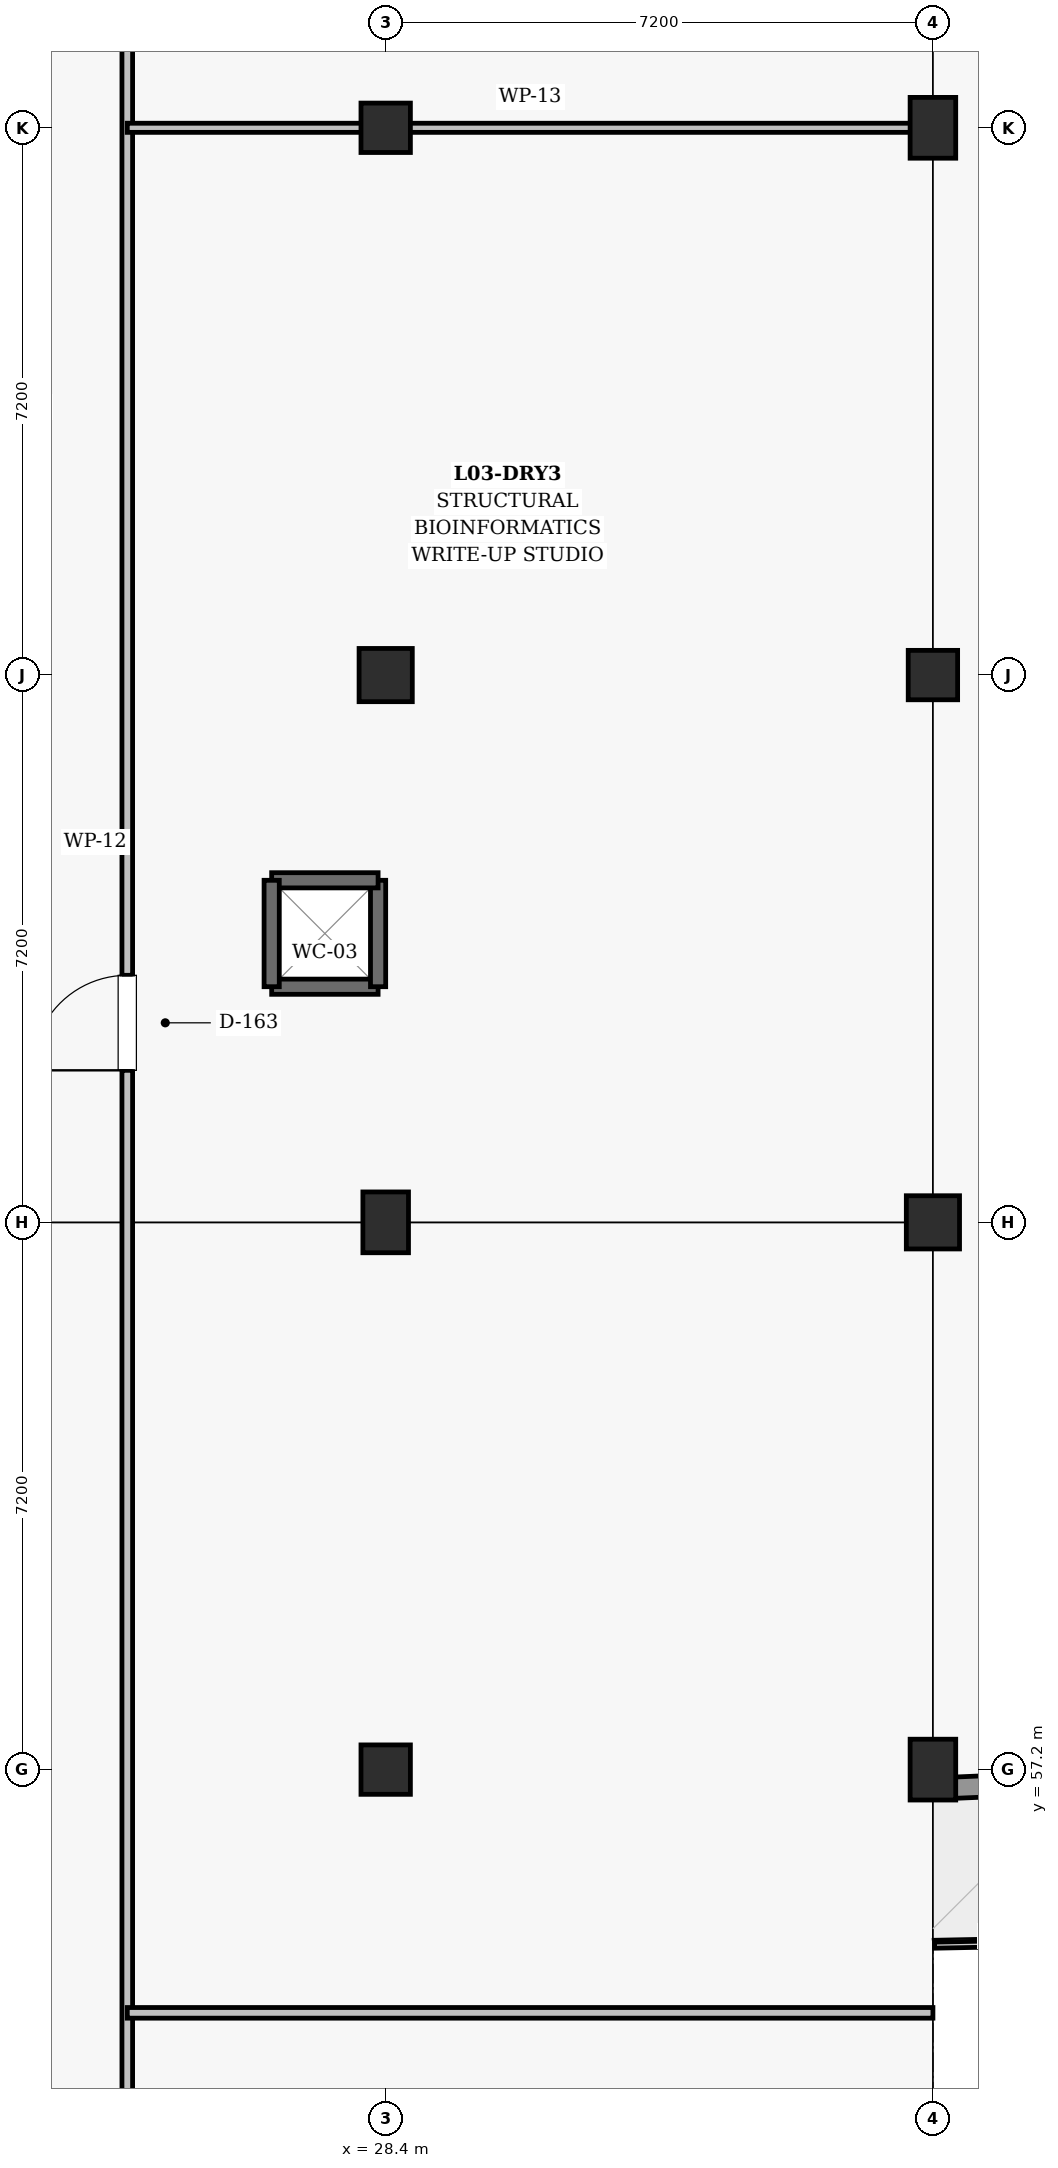
"""IFC4 building model, lengths in metres.
Left out: names, types, materials, properties, quantities, classifications, styles, units other than length and angle.
Written with IfcOpenShell. Run it as: python <this file> out.ifc"""

import sys

from ifc_helpers import new_model, si_unit, direction, frame, frame_2d, origin, origin_2d, place, context, subcontext, project, spatial, rectangle, extrude, element, fill, save


model = new_model("IFC4")
c1 = context("Model", 3, precision=1e-05, world=origin(), true_north=direction((0.0, 1.0)))
c2 = subcontext(c1, "Body", "Model", "MODEL_VIEW")
j1 = project(units=[si_unit("LENGTHUNIT", "METRE"), si_unit("PLANEANGLEUNIT", "RADIAN")], contexts=[c1])
p1 = place(None, origin())
s1 = spatial("IfcSite", under=j1, at=p1, CompositionType="ELEMENT")
p2 = place(p1, origin())
s2 = spatial("IfcBuilding", under=s1, at=p2, CompositionType="ELEMENT")
p3 = place(p2, frame((0.0, 0.0, 14.4)))
s3 = spatial("IfcBuildingStorey", under=s2, at=p3, CompositionType="ELEMENT", Elevation=14.4)
p4 = place(p3, frame((28.4, 57.2, 0.0), z_axis=(0.0, 0.0, 1.0), x_axis=(1.0, 0.0, 0.0)))
e1 = element("IfcColumn", 1, at=p4, inside=s3, PredefinedType="COLUMN", context=c2, shape_type="SweptSolid", body=[
    extrude(rectangle(XDim=0.65, YDim=0.65, at=origin_2d()), origin(), (0.0, 0.0, 1.0), 4.5),
])
p5 = place(p3, frame((28.4, 64.4, 0.0), z_axis=(0.0, 0.0, 1.0), x_axis=(1.0, 0.0, 0.0)))
e2 = element("IfcColumn", 2, at=p5, inside=s3, PredefinedType="COLUMN", context=c2, shape_type="SweptSolid", body=[
    extrude(rectangle(XDim=0.6, YDim=0.8, at=origin_2d()), origin(), (0.0, 0.0, 1.0), 4.5),
])
p6 = place(p3, frame((28.4, 71.6, 0.0), z_axis=(0.0, 0.0, 1.0), x_axis=(1.0, 0.0, 0.0)))
e3 = element("IfcColumn", 3, at=p6, inside=s3, PredefinedType="COLUMN", context=c2, shape_type="SweptSolid", body=[
    extrude(rectangle(XDim=0.7, YDim=0.7, at=origin_2d()), origin(), (0.0, 0.0, 1.0), 4.5),
])
p7 = place(p3, frame((28.4, 78.8, 0.0), z_axis=(0.0, 0.0, 1.0), x_axis=(1.0, 0.0, 0.0)))
e4 = element("IfcColumn", 4, at=p7, inside=s3, PredefinedType="COLUMN", context=c2, shape_type="SweptSolid", body=[
    extrude(rectangle(XDim=0.65, YDim=0.65, at=origin_2d()), origin(), (0.0, 0.0, 1.0), 4.5),
])
p8 = place(p3, frame((35.6, 57.2, 0.0), z_axis=(0.0, 0.0, 1.0), x_axis=(1.0, 0.0, 0.0)))
e5 = element("IfcColumn", 5, at=p8, inside=s3, PredefinedType="COLUMN", context=c2, shape_type="SweptSolid", body=[
    extrude(rectangle(XDim=0.6, YDim=0.8, at=origin_2d()), origin(), (0.0, 0.0, 1.0), 4.5),
])
p9 = place(p3, frame((35.6, 64.4, 0.0), z_axis=(0.0, 0.0, 1.0), x_axis=(1.0, 0.0, 0.0)))
e6 = element("IfcColumn", 6, at=p9, inside=s3, PredefinedType="COLUMN", context=c2, shape_type="SweptSolid", body=[
    extrude(rectangle(XDim=0.7, YDim=0.7, at=origin_2d()), origin(), (0.0, 0.0, 1.0), 4.5),
])
p10 = place(p3, frame((35.6, 71.6, 0.0), z_axis=(0.0, 0.0, 1.0), x_axis=(1.0, 0.0, 0.0)))
e7 = element("IfcColumn", 7, at=p10, inside=s3, PredefinedType="COLUMN", context=c2, shape_type="SweptSolid", body=[
    extrude(rectangle(XDim=0.65, YDim=0.65, at=origin_2d()), origin(), (0.0, 0.0, 1.0), 4.5),
])
p11 = place(p3, frame((35.6, 78.8, 0.0), z_axis=(0.0, 0.0, 1.0), x_axis=(1.0, 0.0, 0.0)))
e8 = element("IfcColumn", 8, at=p11, inside=s3, PredefinedType="COLUMN", context=c2, shape_type="SweptSolid", body=[
    extrude(rectangle(XDim=0.6, YDim=0.8, at=origin_2d()), origin(), (0.0, 0.0, 1.0), 4.5),
])
p12 = place(p3, frame((35.6, 56.95, 0.0), z_axis=(0.0, 0.0, 1.0), x_axis=(0.999097710673, 0.042470749097, 0.0)))
e9 = element("IfcWall", 9, at=p12, inside=s3, PredefinedType="SOLIDWALL", context=c2, shape_type="SweptSolid", body=[
    extrude(rectangle(XDim=3.892, YDim=0.28, at=frame_2d((1.946, 0.0))), origin(), (0.0, 0.0, 1.0), 3.425),
])
p13 = place(p3, frame((26.9, 67.5, 0.0), z_axis=(0.0, 0.0, 1.0), x_axis=(1.0, 0.0, 0.0)))
e10 = element("IfcWall", 10, at=p13, inside=s3, PredefinedType="SHEAR", context=c2, shape_type="SweptSolid", body=[
    extrude(rectangle(XDim=1.4, YDim=0.2, at=frame_2d((0.7, 0.0))), origin(), (0.0, 0.0, 1.0), 4.16),
])
p14 = place(p3, frame((28.3, 67.5, 0.0), z_axis=(0.0, 0.0, 1.0), x_axis=(0.0, 1.0, 0.0)))
e11 = element("IfcWall", 11, at=p14, inside=s3, PredefinedType="SHEAR", context=c2, shape_type="SweptSolid", body=[
    extrude(rectangle(XDim=1.4, YDim=0.2, at=frame_2d((0.7, 0.0))), origin(), (0.0, 0.0, 1.0), 4.16),
])
p15 = place(p3, frame((28.3, 68.9, 0.0), z_axis=(0.0, 0.0, 1.0), x_axis=(-1.0, 0.0, 0.0)))
e12 = element("IfcWall", 12, at=p15, inside=s3, PredefinedType="SHEAR", context=c2, shape_type="SweptSolid", body=[
    extrude(rectangle(XDim=1.4, YDim=0.2, at=frame_2d((0.7, 0.0))), origin(), (0.0, 0.0, 1.0), 4.16),
])
p16 = place(p3, frame((26.9, 68.9, 0.0), z_axis=(0.0, 0.0, 1.0), x_axis=(0.0, -1.0, 0.0)))
e13 = element("IfcWall", 13, at=p16, inside=s3, PredefinedType="SHEAR", context=c2, shape_type="SweptSolid", body=[
    extrude(rectangle(XDim=1.4, YDim=0.2, at=frame_2d((0.7, 0.0))), origin(), (0.0, 0.0, 1.0), 4.16),
])
p17 = place(p3, frame((25.0, 36.0, 0.0), z_axis=(0.0, 0.0, 1.0), x_axis=(0.0, 1.0, 0.0)))
e14 = element("IfcWall", 14, at=p17, inside=s3, PredefinedType="PARTITIONING", context=c2, shape_type="SweptSolid", body=[
    extrude(rectangle(XDim=66.8, YDim=0.14, at=frame_2d((33.4, 0.0))), origin(), (0.0, 0.0, 1.0), 3.38),
])
p18 = place(p17, frame((9.0, 0.0, 0.0)))
e15 = element("IfcOpeningElement", 15, at=p18, cuts=e14, PredefinedType="OPENING", context=c2, shape_type="SweptSolid", body=[
    extrude(rectangle(XDim=1.18, YDim=2.2, at=frame_2d((0.59, 1.1))), frame((0.0, 0.08, 0.0), z_axis=(0.0, -1.0, 0.0), x_axis=(1.0, 0.0, 0.0)), (0.0, 0.0, 1.0), 0.16),
])
p19 = place(p17, frame((30.4, 0.0, 0.0)))
e16 = element("IfcOpeningElement", 16, at=p19, cuts=e14, PredefinedType="OPENING", context=c2, shape_type="SweptSolid", body=[
    extrude(rectangle(XDim=1.25, YDim=2.2, at=frame_2d((0.625, 1.1))), frame((0.0, 0.08, 0.0), z_axis=(0.0, -1.0, 0.0), x_axis=(1.0, 0.0, 0.0)), (0.0, 0.0, 1.0), 0.16),
])
p20 = place(p17, frame((54.6, 0.0, 0.0)))
e17 = element("IfcOpeningElement", 17, at=p20, cuts=e14, PredefinedType="OPENING", context=c2, shape_type="SweptSolid", body=[
    extrude(rectangle(XDim=1.35, YDim=2.2, at=frame_2d((0.675, 1.1))), frame((0.0, 0.08, 0.0), z_axis=(0.0, -1.0, 0.0), x_axis=(1.0, 0.0, 0.0)), (0.0, 0.0, 1.0), 0.16),
])
p21 = place(p3, frame((25.0, 54.0, 0.0), z_axis=(0.0, 0.0, 1.0), x_axis=(1.0, 0.0, 0.0)))
e18 = element("IfcWall", 18, at=p21, inside=s3, PredefinedType="PARTITIONING", context=c2, shape_type="SweptSolid", body=[
    extrude(rectangle(XDim=10.6, YDim=0.14, at=frame_2d((5.3, 0.0))), origin(), (0.0, 0.0, 1.0), 3.48),
])
p22 = place(p3, frame((25.0, 78.8, 0.0), z_axis=(0.0, 0.0, 1.0), x_axis=(1.0, 0.0, 0.0)))
e19 = element("IfcWall", 19, at=p22, inside=s3, PredefinedType="PARTITIONING", context=c2, shape_type="SweptSolid", body=[
    extrude(rectangle(XDim=10.6, YDim=0.12, at=frame_2d((5.3, 0.0))), origin(), (0.0, 0.0, 1.0), 3.46),
])
p23 = place(p19, origin())
e20 = element("IfcDoor", 20, at=p23, inside=s3, OperationType="SINGLE_SWING_LEFT", PredefinedType="DOOR", context=c2, shape_type="SweptSolid", body=[
    extrude(rectangle(XDim=1.25, YDim=2.2, at=frame_2d((0.625, 1.1))), frame((0.0, 0.025, 0.0), z_axis=(0.0, -1.0, 0.0), x_axis=(1.0, 0.0, 0.0)), (0.0, 0.0, 1.0), 0.05),
])
fill(e16, e20)
save(model, sys.argv[1])
